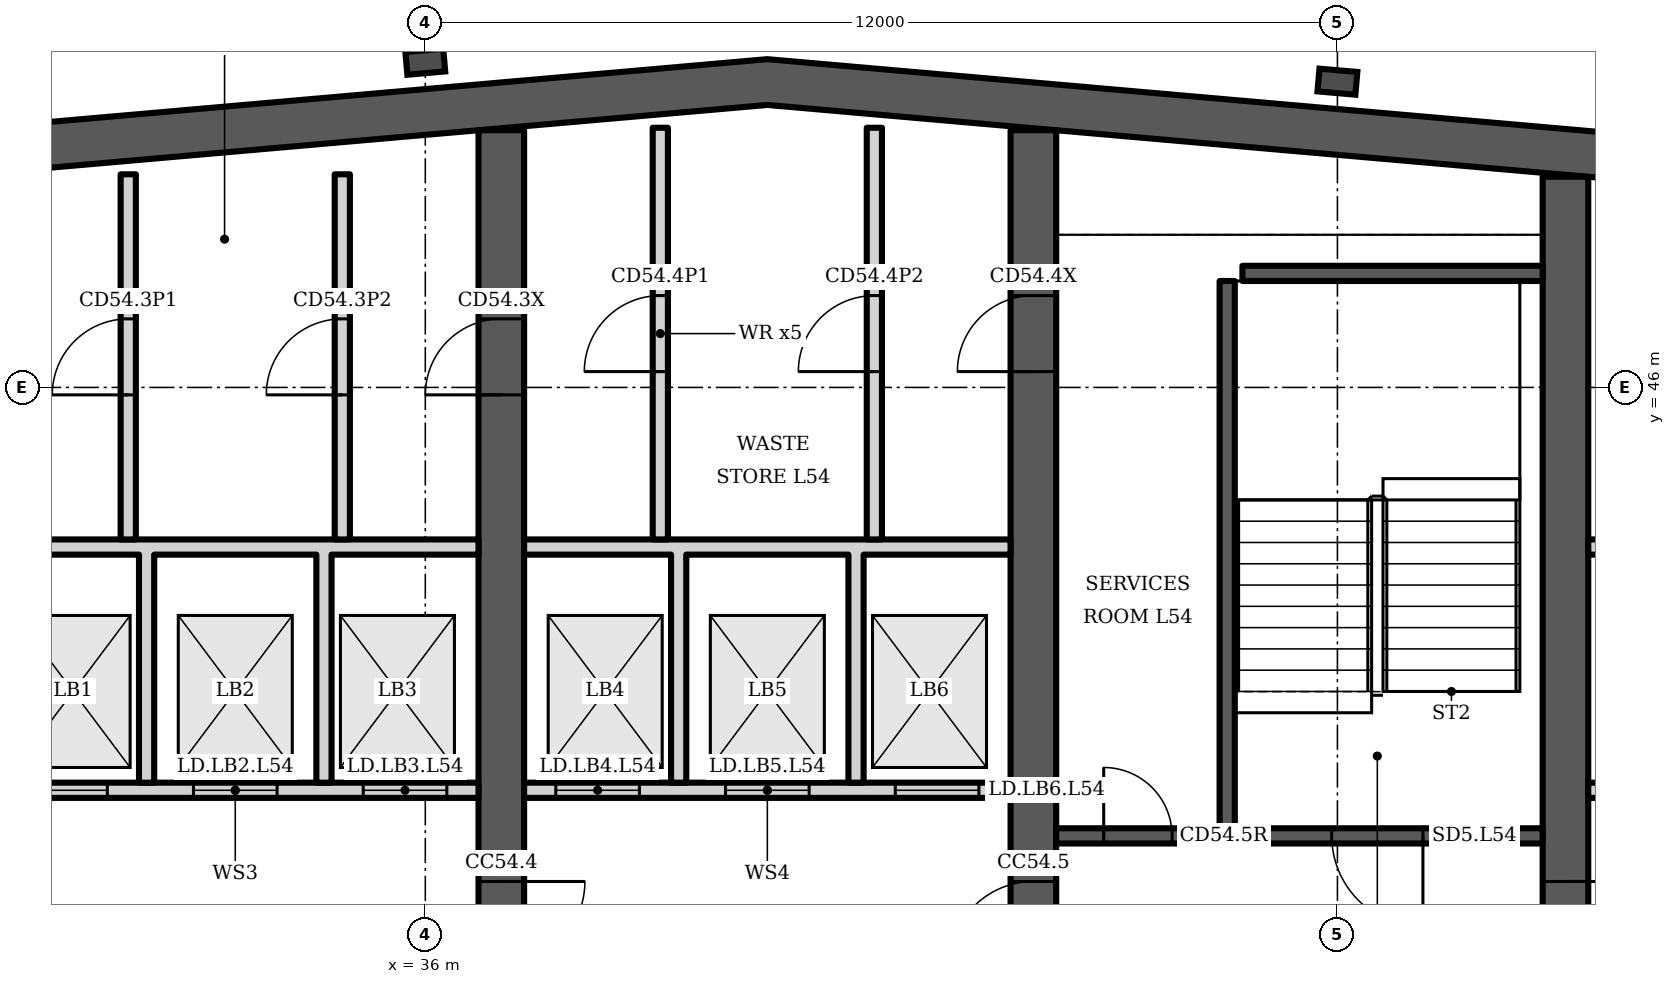
"""IFC4 building model, lengths in metres.
Left out: names, types, materials, properties, quantities, classifications, styles, units other than length and angle.
Written with IfcOpenShell. Run it as: python <this file> out.ifc"""

import sys

from ifc_helpers import new_model, si_unit, direction, frame, frame_2d, origin, origin_2d, place, context, subcontext, project, spatial, polyline, rectangle, i_section, outline, extrude, element, fill, save


model = new_model("IFC4")
c1 = context("Model", 3, precision=1e-05, world=origin(), true_north=direction((0.0, 1.0)))
c2 = subcontext(c1, "Body", "Model", "MODEL_VIEW")
j1 = project(units=[si_unit("LENGTHUNIT", "METRE"), si_unit("PLANEANGLEUNIT", "RADIAN")], contexts=[c1])
p1 = place(None, origin())
s1 = spatial("IfcSite", under=j1, at=p1, CompositionType="ELEMENT")
p2 = place(p1, origin())
s2 = spatial("IfcBuilding", under=s1, at=p2, CompositionType="ELEMENT")
p3 = place(p2, frame((0.0, 0.0, 217.9)))
s3 = spatial("IfcBuildingStorey", under=s2, at=p3, CompositionType="ELEMENT", Elevation=217.9)
p4 = place(p3, origin())
e1 = element("IfcWall", 1, at=p4, inside=s3, PredefinedType="SHEAR", context=c2, shape_type="SweptSolid", body=[
    extrude(outline(polyline([(23.0, 48.185), (40.5, 49.716), (58.0, 48.185), (58.0, 48.787), (40.5, 50.318), (23.0, 48.787), (23.0, 48.185)])), origin(), (0.0, 0.0, 1.0), 3.6),
])
p5 = place(p3, frame((37.0, 34.6, 0.0), z_axis=(0.0, 0.0, 1.0), x_axis=(0.0, 1.0, 0.0)))
e2 = element("IfcWall", 2, at=p5, inside=s3, PredefinedType="SHEAR", context=c2, shape_type="SweptSolid", body=[
    extrude(rectangle(XDim=14.784, YDim=0.6, at=frame_2d((7.392, 0.0))), origin(), (0.0, 0.0, 1.0), 3.6),
])
p6 = place(p5, frame((11.302, 0.0, 0.0)))
e3 = element("IfcOpeningElement", 3, at=p6, cuts=e2, PredefinedType="OPENING", context=c2, shape_type="SweptSolid", body=[
    extrude(rectangle(XDim=1.0, YDim=2.1, at=frame_2d((0.5, 1.05))), frame((0.0, 0.31, 0.0), z_axis=(0.0, -1.0, 0.0), x_axis=(1.0, 0.0, 0.0)), (0.0, 0.0, 1.0), 0.62),
])
p7 = place(p5, frame((3.8, 0.0, 0.0)))
e4 = element("IfcOpeningElement", 4, at=p7, cuts=e2, PredefinedType="OPENING", context=c2, shape_type="SweptSolid", body=[
    extrude(rectangle(XDim=1.1, YDim=2.1, at=frame_2d((0.55, 1.05))), frame((0.0, 0.31, 0.0), z_axis=(0.0, -1.0, 0.0), x_axis=(1.0, 0.0, 0.0)), (0.0, 0.0, 1.0), 0.62),
])
p8 = place(p3, frame((44.0, 34.6, 0.0), z_axis=(0.0, 0.0, 1.0), x_axis=(0.0, 1.0, 0.0)))
e5 = element("IfcWall", 5, at=p8, inside=s3, PredefinedType="SHEAR", context=c2, shape_type="SweptSolid", body=[
    extrude(rectangle(XDim=14.784, YDim=0.6, at=frame_2d((7.392, 0.0))), origin(), (0.0, 0.0, 1.0), 3.6),
])
p9 = place(p8, frame((11.608, 0.0, 0.0)))
e6 = element("IfcOpeningElement", 6, at=p9, cuts=e5, PredefinedType="OPENING", context=c2, shape_type="SweptSolid", body=[
    extrude(rectangle(XDim=1.0, YDim=2.1, at=frame_2d((0.5, 1.05))), frame((0.0, 0.31, 0.0), z_axis=(0.0, -1.0, 0.0), x_axis=(1.0, 0.0, 0.0)), (0.0, 0.0, 1.0), 0.62),
])
p10 = place(p8, frame((3.8, 0.0, 0.0)))
e7 = element("IfcOpeningElement", 7, at=p10, cuts=e5, PredefinedType="OPENING", context=c2, shape_type="SweptSolid", body=[
    extrude(rectangle(XDim=1.1, YDim=2.1, at=frame_2d((0.55, 1.05))), frame((0.0, 0.31, 0.0), z_axis=(0.0, -1.0, 0.0), x_axis=(1.0, 0.0, 0.0)), (0.0, 0.0, 1.0), 0.62),
])
p11 = place(p3, frame((51.0, 34.6, 0.0), z_axis=(0.0, 0.0, 1.0), x_axis=(0.0, 1.0, 0.0)))
e8 = element("IfcWall", 8, at=p11, inside=s3, PredefinedType="SHEAR", context=c2, shape_type="SweptSolid", body=[
    extrude(rectangle(XDim=14.171, YDim=0.6, at=frame_2d((7.085, 0.0))), origin(), (0.0, 0.0, 1.0), 3.6),
])
p12 = place(p11, frame((3.8, 0.0, 0.0)))
e9 = element("IfcOpeningElement", 9, at=p12, cuts=e8, PredefinedType="OPENING", context=c2, shape_type="SweptSolid", body=[
    extrude(rectangle(XDim=1.1, YDim=2.1, at=frame_2d((0.55, 1.05))), frame((0.0, 0.31, 0.0), z_axis=(0.0, -1.0, 0.0), x_axis=(1.0, 0.0, 0.0)), (0.0, 0.0, 1.0), 0.62),
])
for number, where, z_axis, x_axis in (
    (10, (36.0, 50.285, 0.0), (0.0, 0.0, 1.0), (-0.087, 0.996, 0.0)),
    (11, (48.0, 50.022, 0.0), (0.0, 0.0, 1.0), (0.087, 0.996, 0.0)),
):
    element("IfcColumn", number, at=place(p3, frame(where, z_axis=z_axis, x_axis=x_axis)), inside=s3, PredefinedType="COLUMN", context=c2, shape_type="SweptSolid", body=[
        extrude(i_section(OverallWidth=0.3, OverallDepth=0.5, WebThickness=0.014, FlangeThickness=0.028, FilletRadius=0.027, at=origin_2d()), origin(), (0.0, 0.0, 1.0), 3.6),
    ])
p13 = place(p3, frame((30.3, 40.7, 0.0), z_axis=(0.0, 0.0, 1.0), x_axis=(1.0, 0.0, 0.0)))
e12 = element("IfcWall", 12, at=p13, inside=s3, PredefinedType="PARTITIONING", context=c2, shape_type="SweptSolid", body=[
    extrude(rectangle(XDim=6.4, YDim=0.2, at=frame_2d((3.2, 0.0))), origin(), (0.0, 0.0, 1.0), 3.2),
])
p14 = place(p13, frame((0.417, 0.0, 0.0)))
e13 = element("IfcOpeningElement", 13, at=p14, cuts=e12, PredefinedType="OPENING", context=c2, shape_type="SweptSolid", body=[
    extrude(rectangle(XDim=1.1, YDim=2.1, at=frame_2d((0.55, 1.05))), frame((0.0, 0.11, 0.0), z_axis=(0.0, -1.0, 0.0), x_axis=(1.0, 0.0, 0.0)), (0.0, 0.0, 1.0), 0.22),
])
p15 = place(p13, frame((2.65, 0.0, 0.0)))
e14 = element("IfcOpeningElement", 14, at=p15, cuts=e12, PredefinedType="OPENING", context=c2, shape_type="SweptSolid", body=[
    extrude(rectangle(XDim=1.1, YDim=2.1, at=frame_2d((0.55, 1.05))), frame((0.0, 0.11, 0.0), z_axis=(0.0, -1.0, 0.0), x_axis=(1.0, 0.0, 0.0)), (0.0, 0.0, 1.0), 0.22),
])
p16 = place(p13, frame((4.883, 0.0, 0.0)))
e15 = element("IfcOpeningElement", 15, at=p16, cuts=e12, PredefinedType="OPENING", context=c2, shape_type="SweptSolid", body=[
    extrude(rectangle(XDim=1.1, YDim=2.1, at=frame_2d((0.55, 1.05))), frame((0.0, 0.11, 0.0), z_axis=(0.0, -1.0, 0.0), x_axis=(1.0, 0.0, 0.0)), (0.0, 0.0, 1.0), 0.22),
])
p17 = place(p3, origin())
e16 = element("IfcWall", 16, at=p17, inside=s3, PredefinedType="PARTITIONING", context=c2, shape_type="SweptSolid", body=[
    extrude(outline(polyline([(32.433, 40.8), (32.233, 40.8), (32.233, 43.8), (30.3, 43.8), (30.3, 44.0), (36.7, 44.0), (36.7, 43.8), (34.767, 43.8), (34.767, 40.8), (34.567, 40.8), (34.567, 43.8), (32.433, 43.8), (32.433, 40.8)])), origin(), (0.0, 0.0, 1.0), 3.2),
])
p18 = place(p3, frame((32.092, 44.0, 0.0), z_axis=(0.0, 0.0, 1.0), x_axis=(0.0, 1.0, 0.0)))
e17 = element("IfcWall", 17, at=p18, inside=s3, PredefinedType="PARTITIONING", context=c2, shape_type="SweptSolid", body=[
    extrude(rectangle(XDim=4.804, YDim=0.2, at=frame_2d((2.402, 0.0))), origin(), (0.0, 0.0, 1.0), 3.2),
])
p19 = place(p18, frame((1.902, 0.0, 0.0)))
e18 = element("IfcOpeningElement", 18, at=p19, cuts=e17, PredefinedType="OPENING", context=c2, shape_type="SweptSolid", body=[
    extrude(rectangle(XDim=1.0, YDim=2.1, at=frame_2d((0.5, 1.05))), frame((0.0, 0.11, 0.0), z_axis=(0.0, -1.0, 0.0), x_axis=(1.0, 0.0, 0.0)), (0.0, 0.0, 1.0), 0.22),
])
p20 = place(p3, frame((34.908, 44.0, 0.0), z_axis=(0.0, 0.0, 1.0), x_axis=(0.0, 1.0, 0.0)))
e19 = element("IfcWall", 19, at=p20, inside=s3, PredefinedType="PARTITIONING", context=c2, shape_type="SweptSolid", body=[
    extrude(rectangle(XDim=4.804, YDim=0.2, at=frame_2d((2.402, 0.0))), origin(), (0.0, 0.0, 1.0), 3.2),
])
p21 = place(p20, frame((1.902, 0.0, 0.0)))
e20 = element("IfcOpeningElement", 20, at=p21, cuts=e19, PredefinedType="OPENING", context=c2, shape_type="SweptSolid", body=[
    extrude(rectangle(XDim=1.0, YDim=2.1, at=frame_2d((0.5, 1.05))), frame((0.0, 0.11, 0.0), z_axis=(0.0, -1.0, 0.0), x_axis=(1.0, 0.0, 0.0)), (0.0, 0.0, 1.0), 0.22),
])
p22 = place(p3, frame((37.3, 40.7, 0.0), z_axis=(0.0, 0.0, 1.0), x_axis=(1.0, 0.0, 0.0)))
e21 = element("IfcWall", 21, at=p22, inside=s3, PredefinedType="PARTITIONING", context=c2, shape_type="SweptSolid", body=[
    extrude(rectangle(XDim=6.4, YDim=0.2, at=frame_2d((3.2, 0.0))), origin(), (0.0, 0.0, 1.0), 3.2),
])
p23 = place(p22, frame((0.417, 0.0, 0.0)))
e22 = element("IfcOpeningElement", 22, at=p23, cuts=e21, PredefinedType="OPENING", context=c2, shape_type="SweptSolid", body=[
    extrude(rectangle(XDim=1.1, YDim=2.1, at=frame_2d((0.55, 1.05))), frame((0.0, 0.11, 0.0), z_axis=(0.0, -1.0, 0.0), x_axis=(1.0, 0.0, 0.0)), (0.0, 0.0, 1.0), 0.22),
])
p24 = place(p22, frame((2.65, 0.0, 0.0)))
e23 = element("IfcOpeningElement", 23, at=p24, cuts=e21, PredefinedType="OPENING", context=c2, shape_type="SweptSolid", body=[
    extrude(rectangle(XDim=1.1, YDim=2.1, at=frame_2d((0.55, 1.05))), frame((0.0, 0.11, 0.0), z_axis=(0.0, -1.0, 0.0), x_axis=(1.0, 0.0, 0.0)), (0.0, 0.0, 1.0), 0.22),
])
p25 = place(p22, frame((4.883, 0.0, 0.0)))
e24 = element("IfcOpeningElement", 24, at=p25, cuts=e21, PredefinedType="OPENING", context=c2, shape_type="SweptSolid", body=[
    extrude(rectangle(XDim=1.1, YDim=2.1, at=frame_2d((0.55, 1.05))), frame((0.0, 0.11, 0.0), z_axis=(0.0, -1.0, 0.0), x_axis=(1.0, 0.0, 0.0)), (0.0, 0.0, 1.0), 0.22),
])
p26 = place(p3, origin())
e25 = element("IfcWall", 25, at=p26, inside=s3, PredefinedType="PARTITIONING", context=c2, shape_type="SweptSolid", body=[
    extrude(outline(polyline([(39.433, 40.8), (39.233, 40.8), (39.233, 43.8), (37.3, 43.8), (37.3, 44.0), (43.7, 44.0), (43.7, 43.8), (41.767, 43.8), (41.767, 40.8), (41.567, 40.8), (41.567, 43.8), (39.433, 43.8), (39.433, 40.8)])), origin(), (0.0, 0.0, 1.0), 3.2),
])
p27 = place(p3, frame((39.092, 44.0, 0.0), z_axis=(0.0, 0.0, 1.0), x_axis=(0.0, 1.0, 0.0)))
e26 = element("IfcWall", 26, at=p27, inside=s3, PredefinedType="PARTITIONING", context=c2, shape_type="SweptSolid", body=[
    extrude(rectangle(XDim=5.416, YDim=0.2, at=frame_2d((2.708, 0.0))), origin(), (0.0, 0.0, 1.0), 3.2),
])
p28 = place(p27, frame((2.208, 0.0, 0.0)))
e27 = element("IfcOpeningElement", 27, at=p28, cuts=e26, PredefinedType="OPENING", context=c2, shape_type="SweptSolid", body=[
    extrude(rectangle(XDim=1.0, YDim=2.1, at=frame_2d((0.5, 1.05))), frame((0.0, 0.11, 0.0), z_axis=(0.0, -1.0, 0.0), x_axis=(1.0, 0.0, 0.0)), (0.0, 0.0, 1.0), 0.22),
])
p29 = place(p3, frame((41.908, 44.0, 0.0), z_axis=(0.0, 0.0, 1.0), x_axis=(0.0, 1.0, 0.0)))
e28 = element("IfcWall", 28, at=p29, inside=s3, PredefinedType="PARTITIONING", context=c2, shape_type="SweptSolid", body=[
    extrude(rectangle(XDim=5.416, YDim=0.2, at=frame_2d((2.708, 0.0))), origin(), (0.0, 0.0, 1.0), 3.2),
])
p30 = place(p29, frame((2.208, 0.0, 0.0)))
e29 = element("IfcOpeningElement", 29, at=p30, cuts=e28, PredefinedType="OPENING", context=c2, shape_type="SweptSolid", body=[
    extrude(rectangle(XDim=1.0, YDim=2.1, at=frame_2d((0.5, 1.05))), frame((0.0, 0.11, 0.0), z_axis=(0.0, -1.0, 0.0), x_axis=(1.0, 0.0, 0.0)), (0.0, 0.0, 1.0), 0.22),
])
p31 = place(p3, frame((44.3, 40.1, 0.0), z_axis=(0.0, 0.0, 1.0), x_axis=(1.0, 0.0, 0.0)))
e30 = element("IfcWall", 30, at=p31, inside=s3, PredefinedType="SHEAR", context=c2, shape_type="SweptSolid", body=[
    extrude(rectangle(XDim=6.4, YDim=0.2, at=frame_2d((3.2, 0.0))), origin(), (0.0, 0.0, 1.0), 3.2),
])
p32 = place(p31, frame((3.625, 0.0, 0.0)))
e31 = element("IfcOpeningElement", 31, at=p32, cuts=e30, PredefinedType="OPENING", context=c2, shape_type="SweptSolid", body=[
    extrude(rectangle(XDim=1.2, YDim=2.1, at=frame_2d((0.6, 1.05))), frame((0.0, 0.11, 0.0), z_axis=(0.0, -1.0, 0.0), x_axis=(1.0, 0.0, 0.0)), (0.0, 0.0, 1.0), 0.22),
])
p33 = place(p31, frame((0.625, 0.0, 0.0)))
e32 = element("IfcOpeningElement", 32, at=p33, cuts=e30, PredefinedType="OPENING", context=c2, shape_type="SweptSolid", body=[
    extrude(rectangle(XDim=0.9, YDim=2.1, at=frame_2d((0.45, 1.05))), frame((0.0, 0.11, 0.0), z_axis=(0.0, -1.0, 0.0), x_axis=(1.0, 0.0, 0.0)), (0.0, 0.0, 1.0), 0.22),
])
p34 = place(p3, frame((46.55, 40.2, 0.0), z_axis=(0.0, 0.0, 1.0), x_axis=(0.0, 1.0, 0.0)))
e33 = element("IfcWall", 33, at=p34, inside=s3, PredefinedType="SHEAR", context=c2, shape_type="SweptSolid", body=[
    extrude(rectangle(XDim=7.2, YDim=0.2, at=frame_2d((3.6, 0.0))), origin(), (0.0, 0.0, 1.0), 3.2),
])
p35 = place(p3, frame((46.75, 47.5, 0.0), z_axis=(0.0, 0.0, 1.0), x_axis=(1.0, 0.0, 0.0)))
e34 = element("IfcWall", 34, at=p35, inside=s3, PredefinedType="SHEAR", context=c2, shape_type="SweptSolid", body=[
    extrude(rectangle(XDim=3.95, YDim=0.2, at=frame_2d((1.975, 0.0))), origin(), (0.0, 0.0, 1.0), 3.2),
])
p36 = place(p3, frame((51.3, 40.7, 0.0), z_axis=(0.0, 0.0, 1.0), x_axis=(1.0, 0.0, 0.0)))
e35 = element("IfcWall", 35, at=p36, inside=s3, PredefinedType="PARTITIONING", context=c2, shape_type="SweptSolid", body=[
    extrude(rectangle(XDim=6.1, YDim=0.2, at=frame_2d((3.05, 0.0))), origin(), (0.0, 0.0, 1.0), 3.2),
])
p37 = place(p36, frame((0.417, 0.0, 0.0)))
e36 = element("IfcOpeningElement", 36, at=p37, cuts=e35, PredefinedType="OPENING", context=c2, shape_type="SweptSolid", body=[
    extrude(rectangle(XDim=1.1, YDim=2.1, at=frame_2d((0.55, 1.05))), frame((0.0, 0.11, 0.0), z_axis=(0.0, -1.0, 0.0), x_axis=(1.0, 0.0, 0.0)), (0.0, 0.0, 1.0), 0.22),
])
p38 = place(p36, frame((3.617, 0.0, 0.0)))
e37 = element("IfcOpeningElement", 37, at=p38, cuts=e35, PredefinedType="OPENING", context=c2, shape_type="SweptSolid", body=[
    extrude(rectangle(XDim=1.0, YDim=2.1, at=frame_2d((0.5, 1.05))), frame((0.0, 0.11, 0.0), z_axis=(0.0, -1.0, 0.0), x_axis=(1.0, 0.0, 0.0)), (0.0, 0.0, 1.0), 0.22),
])
p39 = place(p3, frame((51.3, 43.9, 0.0), z_axis=(0.0, 0.0, 1.0), x_axis=(1.0, 0.0, 0.0)))
e38 = element("IfcWall", 38, at=p39, inside=s3, PredefinedType="PARTITIONING", context=c2, shape_type="SweptSolid", body=[
    extrude(rectangle(XDim=6.1, YDim=0.2, at=frame_2d((3.05, 0.0))), origin(), (0.0, 0.0, 1.0), 3.2),
])
p40 = place(p39, frame((2.817, 0.0, 0.0)))
e39 = element("IfcOpeningElement", 39, at=p40, cuts=e38, PredefinedType="OPENING", context=c2, shape_type="SweptSolid", body=[
    extrude(rectangle(XDim=1.0, YDim=2.1, at=frame_2d((0.5, 1.05))), frame((0.0, 0.11, 0.0), z_axis=(0.0, -1.0, 0.0), x_axis=(1.0, 0.0, 0.0)), (0.0, 0.0, 1.0), 0.22),
])
p41 = place(p39, frame((4.8, 0.0, 0.0)))
e40 = element("IfcOpeningElement", 40, at=p41, cuts=e38, PredefinedType="OPENING", context=c2, shape_type="SweptSolid", body=[
    extrude(rectangle(XDim=1.0, YDim=2.1, at=frame_2d((0.5, 1.05))), frame((0.0, 0.11, 0.0), z_axis=(0.0, -1.0, 0.0), x_axis=(1.0, 0.0, 0.0)), (0.0, 0.0, 1.0), 0.22),
])
p42 = place(p14, origin())
e41 = element("IfcDoor", 41, at=p42, inside=s3, OperationType="DOUBLE_DOOR_SLIDING", PredefinedType="DOOR", context=c2, shape_type="SweptSolid", body=[
    extrude(rectangle(XDim=1.1, YDim=2.1, at=frame_2d((0.55, 1.05))), frame((0.0, 0.025, 0.0), z_axis=(0.0, -1.0, 0.0), x_axis=(1.0, 0.0, 0.0)), (0.0, 0.0, 1.0), 0.05),
])
fill(e13, e41)
p43 = place(p15, origin())
e42 = element("IfcDoor", 42, at=p43, inside=s3, OperationType="DOUBLE_DOOR_SLIDING", PredefinedType="DOOR", context=c2, shape_type="SweptSolid", body=[
    extrude(rectangle(XDim=1.1, YDim=2.1, at=frame_2d((0.55, 1.05))), frame((0.0, 0.025, 0.0), z_axis=(0.0, -1.0, 0.0), x_axis=(1.0, 0.0, 0.0)), (0.0, 0.0, 1.0), 0.05),
])
fill(e14, e42)
p44 = place(p16, origin())
e43 = element("IfcDoor", 43, at=p44, inside=s3, OperationType="DOUBLE_DOOR_SLIDING", PredefinedType="DOOR", context=c2, shape_type="SweptSolid", body=[
    extrude(rectangle(XDim=1.1, YDim=2.1, at=frame_2d((0.55, 1.05))), frame((0.0, 0.025, 0.0), z_axis=(0.0, -1.0, 0.0), x_axis=(1.0, 0.0, 0.0)), (0.0, 0.0, 1.0), 0.05),
])
fill(e15, e43)
p45 = place(p19, origin())
e44 = element("IfcDoor", 44, at=p45, inside=s3, OperationType="SINGLE_SWING_LEFT", PredefinedType="DOOR", context=c2, shape_type="SweptSolid", body=[
    extrude(rectangle(XDim=1.0, YDim=2.1, at=frame_2d((0.5, 1.05))), frame((0.0, 0.025, 0.0), z_axis=(0.0, -1.0, 0.0), x_axis=(1.0, 0.0, 0.0)), (0.0, 0.0, 1.0), 0.05),
])
fill(e18, e44)
p46 = place(p21, origin())
e45 = element("IfcDoor", 45, at=p46, inside=s3, OperationType="SINGLE_SWING_LEFT", PredefinedType="DOOR", context=c2, shape_type="SweptSolid", body=[
    extrude(rectangle(XDim=1.0, YDim=2.1, at=frame_2d((0.5, 1.05))), frame((0.0, 0.025, 0.0), z_axis=(0.0, -1.0, 0.0), x_axis=(1.0, 0.0, 0.0)), (0.0, 0.0, 1.0), 0.05),
])
fill(e20, e45)
p47 = place(p6, origin())
e46 = element("IfcDoor", 46, at=p47, inside=s3, OperationType="SINGLE_SWING_LEFT", PredefinedType="DOOR", context=c2, shape_type="SweptSolid", body=[
    extrude(rectangle(XDim=1.0, YDim=2.1, at=frame_2d((0.5, 1.05))), frame((0.0, 0.025, 0.0), z_axis=(0.0, -1.0, 0.0), x_axis=(1.0, 0.0, 0.0)), (0.0, 0.0, 1.0), 0.05),
])
fill(e3, e46)
p48 = place(p23, origin())
e47 = element("IfcDoor", 47, at=p48, inside=s3, OperationType="DOUBLE_DOOR_SLIDING", PredefinedType="DOOR", context=c2, shape_type="SweptSolid", body=[
    extrude(rectangle(XDim=1.1, YDim=2.1, at=frame_2d((0.55, 1.05))), frame((0.0, 0.025, 0.0), z_axis=(0.0, -1.0, 0.0), x_axis=(1.0, 0.0, 0.0)), (0.0, 0.0, 1.0), 0.05),
])
fill(e22, e47)
p49 = place(p24, origin())
e48 = element("IfcDoor", 48, at=p49, inside=s3, OperationType="DOUBLE_DOOR_SLIDING", PredefinedType="DOOR", context=c2, shape_type="SweptSolid", body=[
    extrude(rectangle(XDim=1.1, YDim=2.1, at=frame_2d((0.55, 1.05))), frame((0.0, 0.025, 0.0), z_axis=(0.0, -1.0, 0.0), x_axis=(1.0, 0.0, 0.0)), (0.0, 0.0, 1.0), 0.05),
])
fill(e23, e48)
p50 = place(p25, origin())
e49 = element("IfcDoor", 49, at=p50, inside=s3, OperationType="DOUBLE_DOOR_SLIDING", PredefinedType="DOOR", context=c2, shape_type="SweptSolid", body=[
    extrude(rectangle(XDim=1.1, YDim=2.1, at=frame_2d((0.55, 1.05))), frame((0.0, 0.025, 0.0), z_axis=(0.0, -1.0, 0.0), x_axis=(1.0, 0.0, 0.0)), (0.0, 0.0, 1.0), 0.05),
])
fill(e24, e49)
p51 = place(p28, origin())
e50 = element("IfcDoor", 50, at=p51, inside=s3, OperationType="SINGLE_SWING_LEFT", PredefinedType="DOOR", context=c2, shape_type="SweptSolid", body=[
    extrude(rectangle(XDim=1.0, YDim=2.1, at=frame_2d((0.5, 1.05))), frame((0.0, 0.025, 0.0), z_axis=(0.0, -1.0, 0.0), x_axis=(1.0, 0.0, 0.0)), (0.0, 0.0, 1.0), 0.05),
])
fill(e27, e50)
p52 = place(p30, origin())
e51 = element("IfcDoor", 51, at=p52, inside=s3, OperationType="SINGLE_SWING_LEFT", PredefinedType="DOOR", context=c2, shape_type="SweptSolid", body=[
    extrude(rectangle(XDim=1.0, YDim=2.1, at=frame_2d((0.5, 1.05))), frame((0.0, 0.025, 0.0), z_axis=(0.0, -1.0, 0.0), x_axis=(1.0, 0.0, 0.0)), (0.0, 0.0, 1.0), 0.05),
])
fill(e29, e51)
p53 = place(p9, origin())
e52 = element("IfcDoor", 52, at=p53, inside=s3, OperationType="SINGLE_SWING_LEFT", PredefinedType="DOOR", context=c2, shape_type="SweptSolid", body=[
    extrude(rectangle(XDim=1.0, YDim=2.1, at=frame_2d((0.5, 1.05))), frame((0.0, 0.025, 0.0), z_axis=(0.0, -1.0, 0.0), x_axis=(1.0, 0.0, 0.0)), (0.0, 0.0, 1.0), 0.05),
])
fill(e6, e52)
p54 = place(p32, origin())
e53 = element("IfcDoor", 53, at=p54, inside=s3, OperationType="SINGLE_SWING_RIGHT", PredefinedType="DOOR", context=c2, shape_type="SweptSolid", body=[
    extrude(rectangle(XDim=1.2, YDim=2.1, at=frame_2d((0.6, 1.05))), frame((0.0, 0.025, 0.0), z_axis=(0.0, -1.0, 0.0), x_axis=(1.0, 0.0, 0.0)), (0.0, 0.0, 1.0), 0.05),
])
fill(e31, e53)
p55 = place(p33, origin())
e54 = element("IfcDoor", 54, at=p55, inside=s3, OperationType="SINGLE_SWING_LEFT", PredefinedType="DOOR", context=c2, shape_type="SweptSolid", body=[
    extrude(rectangle(XDim=0.9, YDim=2.1, at=frame_2d((0.45, 1.05))), frame((0.0, 0.025, 0.0), z_axis=(0.0, -1.0, 0.0), x_axis=(1.0, 0.0, 0.0)), (0.0, 0.0, 1.0), 0.05),
])
fill(e32, e54)
p56 = place(p7, origin())
e55 = element("IfcDoor", 55, at=p56, inside=s3, OperationType="SINGLE_SWING_RIGHT", PredefinedType="DOOR", context=c2, shape_type="SweptSolid", body=[
    extrude(rectangle(XDim=1.1, YDim=2.1, at=frame_2d((0.55, 1.05))), frame((0.0, 0.025, 0.0), z_axis=(0.0, -1.0, 0.0), x_axis=(1.0, 0.0, 0.0)), (0.0, 0.0, 1.0), 0.05),
])
fill(e4, e55)
p57 = place(p10, origin())
e56 = element("IfcDoor", 56, at=p57, inside=s3, OperationType="SINGLE_SWING_LEFT", PredefinedType="DOOR", context=c2, shape_type="SweptSolid", body=[
    extrude(rectangle(XDim=1.1, YDim=2.1, at=frame_2d((0.55, 1.05))), frame((0.0, 0.025, 0.0), z_axis=(0.0, -1.0, 0.0), x_axis=(1.0, 0.0, 0.0)), (0.0, 0.0, 1.0), 0.05),
])
fill(e7, e56)
p58 = place(p12, origin())
e57 = element("IfcDoor", 57, at=p58, inside=s3, OperationType="SINGLE_SWING_RIGHT", PredefinedType="DOOR", context=c2, shape_type="SweptSolid", body=[
    extrude(rectangle(XDim=1.1, YDim=2.1, at=frame_2d((0.55, 1.05))), frame((0.0, 0.025, 0.0), z_axis=(0.0, -1.0, 0.0), x_axis=(1.0, 0.0, 0.0)), (0.0, 0.0, 1.0), 0.05),
])
fill(e9, e57)
save(model, sys.argv[1])
